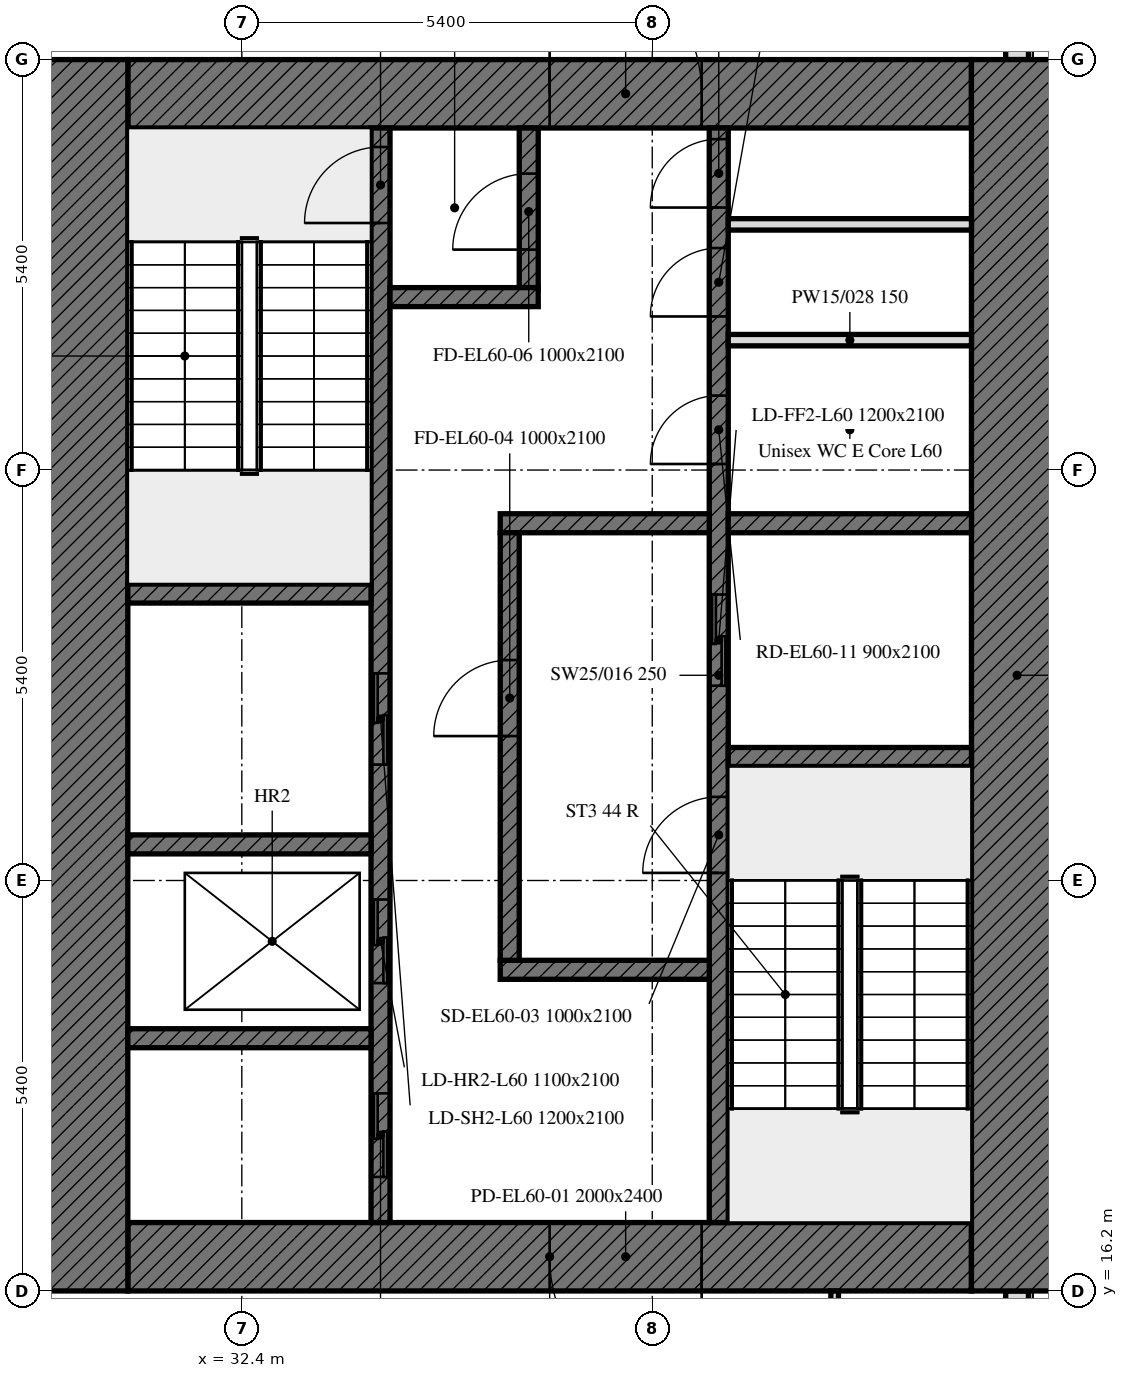
"""IFC4 building model, lengths in metres.
Left out: names, types, materials, properties, quantities, classifications, styles, units other than length and angle.
Written with IfcOpenShell. Run it as: python <this file> out.ifc"""

import sys

from ifc_helpers import new_model, si_unit, direction, frame, frame_2d, origin, place, context, subcontext, project, spatial, rectangle, extrude, element, fill, save


model = new_model("IFC4")
c1 = context("Model", 3, precision=1e-05, world=origin(), true_north=direction((0.0, 1.0)))
c2 = subcontext(c1, "Body", "Model", "MODEL_VIEW")
j1 = project(units=[si_unit("LENGTHUNIT", "METRE"), si_unit("PLANEANGLEUNIT", "RADIAN")], contexts=[c1])
p1 = place(None, origin())
s1 = spatial("IfcSite", under=j1, at=p1, CompositionType="ELEMENT")
p2 = place(p1, origin())
s2 = spatial("IfcBuilding", under=s1, at=p2, CompositionType="ELEMENT")
p3 = place(p2, frame((0.0, 0.0, 243.1)))
s3 = spatial("IfcBuildingStorey", under=s2, at=p3, CompositionType="ELEMENT", Elevation=243.1)
p4 = place(p3, frame((42.6, 10.8, 0.0), z_axis=(0.0, 0.0, 1.0), x_axis=(0.0, 1.0, 0.0)))
e1 = element("IfcWall", 1, at=p4, inside=s3, PredefinedType="SOLIDWALL", context=c2, shape_type="SweptSolid", body=[
    extrude(rectangle(XDim=5.4, YDim=0.3, at=frame_2d((2.7, 0.0))), origin(), (0.0, 0.0, 1.0), 7.5),
])
p5 = place(p4, frame((0.9, 0.0, 0.0)))
e2 = element("IfcOpeningElement", 2, at=p5, cuts=e1, PredefinedType="OPENING", context=c2, shape_type="SweptSolid", body=[
    extrude(rectangle(XDim=1.8, YDim=2.4, at=frame_2d((0.9, 1.2))), frame((0.0, 0.16, 0.0), z_axis=(0.0, -1.0, 0.0), x_axis=(1.0, 0.0, 0.0)), (0.0, 0.0, 1.0), 0.32),
])
p6 = place(p3, frame((42.6, 32.4, 0.0), z_axis=(0.0, 0.0, 1.0), x_axis=(0.0, 1.0, 0.0)))
e3 = element("IfcWall", 3, at=p6, inside=s3, PredefinedType="SOLIDWALL", context=c2, shape_type="SweptSolid", body=[
    extrude(rectangle(XDim=5.214, YDim=0.3, at=frame_2d((2.607, 0.0))), origin(), (0.0, 0.0, 1.0), 7.5),
])
p7 = place(p6, frame((1.3, 0.0, 0.0)))
e4 = element("IfcOpeningElement", 4, at=p7, cuts=e3, PredefinedType="OPENING", context=c2, shape_type="SweptSolid", body=[
    extrude(rectangle(XDim=1.8, YDim=2.4, at=frame_2d((0.9, 1.2))), frame((0.0, 0.16, 0.0), z_axis=(0.0, -1.0, 0.0), x_axis=(1.0, 0.0, 0.0)), (0.0, 0.0, 1.0), 0.32),
])
p8 = place(p3, frame((42.0, 16.65, 0.0), z_axis=(0.0, 0.0, 1.0), x_axis=(-1.0, 0.0, 0.0)))
e5 = element("IfcWall", 5, at=p8, inside=s3, PredefinedType="SOLIDWALL", context=c2, shape_type="SweptSolid", body=[
    extrude(rectangle(XDim=11.1, YDim=0.9, at=frame_2d((5.55, 0.0))), origin(), (0.0, 0.0, 1.0), 7.5),
])
p9 = place(p8, frame((3.55, 0.0, 0.0)))
e6 = element("IfcOpeningElement", 6, at=p9, cuts=e5, PredefinedType="OPENING", context=c2, shape_type="SweptSolid", body=[
    extrude(rectangle(XDim=2.0, YDim=2.4, at=frame_2d((1.0, 1.2))), frame((0.0, 0.45, 0.0), z_axis=(0.0, -1.0, 0.0), x_axis=(1.0, 0.0, 0.0)), (0.0, 0.0, 1.0), 0.9),
])
p10 = place(p3, frame((30.9, 31.95, 0.0), z_axis=(0.0, 0.0, 1.0), x_axis=(1.0, 0.0, 0.0)))
e7 = element("IfcWall", 7, at=p10, inside=s3, PredefinedType="SOLIDWALL", context=c2, shape_type="SweptSolid", body=[
    extrude(rectangle(XDim=11.1, YDim=0.9, at=frame_2d((5.55, 0.0))), origin(), (0.0, 0.0, 1.0), 7.5),
])
p11 = place(p10, frame((5.55, 0.0, 0.0)))
e8 = element("IfcOpeningElement", 8, at=p11, cuts=e7, PredefinedType="OPENING", context=c2, shape_type="SweptSolid", body=[
    extrude(rectangle(XDim=2.0, YDim=2.4, at=frame_2d((1.0, 1.2))), frame((0.0, 0.45, 0.0), z_axis=(0.0, -1.0, 0.0), x_axis=(1.0, 0.0, 0.0)), (0.0, 0.0, 1.0), 0.9),
])
for number, where, z_axis, x_axis in (
    (9, (42.6, 32.4, 0.0), (0.0, 0.0, 1.0), (0.0, -1.0, 0.0)),
    (10, (30.3, 16.2, 0.0), (0.0, 0.0, 1.0), (0.0, 1.0, 0.0)),
):
    element("IfcWall", number, at=place(p3, frame(where, z_axis=z_axis, x_axis=x_axis)), inside=s3, PredefinedType="SOLIDWALL", context=c2, shape_type="SweptSolid", body=[
        extrude(rectangle(XDim=16.2, YDim=1.2, at=frame_2d((8.1, 0.0))), origin(), (0.0, 0.0, 1.0), 7.5),
    ])
p12 = place(p3, frame((38.675, 17.1, 0.0), z_axis=(0.0, 0.0, 1.0), x_axis=(0.0, 1.0, 0.0)))
e11 = element("IfcWall", 11, at=p12, inside=s3, PredefinedType="SOLIDWALL", context=c2, shape_type="SweptSolid", body=[
    extrude(rectangle(XDim=14.4, YDim=0.25, at=frame_2d((7.2, 0.0))), origin(), (0.0, 0.0, 1.0), 7.5),
])
p13 = place(p12, frame((4.6, 0.0, 0.0)))
e12 = element("IfcOpeningElement", 12, at=p13, cuts=e11, PredefinedType="OPENING", context=c2, shape_type="SweptSolid", body=[
    extrude(rectangle(XDim=1.0, YDim=2.1, at=frame_2d((0.5, 1.05))), frame((0.0, 0.125, 0.0), z_axis=(0.0, -1.0, 0.0), x_axis=(1.0, 0.0, 0.0)), (0.0, 0.0, 1.0), 0.25),
])
p14 = place(p12, frame((7.062, 0.0, 0.0)))
e13 = element("IfcOpeningElement", 13, at=p14, cuts=e11, PredefinedType="OPENING", context=c2, shape_type="SweptSolid", body=[
    extrude(rectangle(XDim=1.2, YDim=2.1, at=frame_2d((0.6, 1.05))), frame((0.0, 0.125, 0.0), z_axis=(0.0, -1.0, 0.0), x_axis=(1.0, 0.0, 0.0)), (0.0, 0.0, 1.0), 0.25),
])
p15 = place(p12, frame((9.979, 0.0, 0.0)))
e14 = element("IfcOpeningElement", 14, at=p15, cuts=e11, PredefinedType="OPENING", context=c2, shape_type="SweptSolid", body=[
    extrude(rectangle(XDim=0.9, YDim=2.1, at=frame_2d((0.45, 1.05))), frame((0.0, 0.125, 0.0), z_axis=(0.0, -1.0, 0.0), x_axis=(1.0, 0.0, 0.0)), (0.0, 0.0, 1.0), 0.25),
])
p16 = place(p12, frame((11.92, 0.0, 0.0)))
e15 = element("IfcOpeningElement", 15, at=p16, cuts=e11, PredefinedType="OPENING", context=c2, shape_type="SweptSolid", body=[
    extrude(rectangle(XDim=0.9, YDim=2.1, at=frame_2d((0.45, 1.05))), frame((0.0, 0.125, 0.0), z_axis=(0.0, -1.0, 0.0), x_axis=(1.0, 0.0, 0.0)), (0.0, 0.0, 1.0), 0.25),
])
p17 = place(p12, frame((13.354, 0.0, 0.0)))
e16 = element("IfcOpeningElement", 16, at=p17, cuts=e11, PredefinedType="OPENING", context=c2, shape_type="SweptSolid", body=[
    extrude(rectangle(XDim=0.9, YDim=2.1, at=frame_2d((0.45, 1.05))), frame((0.0, 0.125, 0.0), z_axis=(0.0, -1.0, 0.0), x_axis=(1.0, 0.0, 0.0)), (0.0, 0.0, 1.0), 0.25),
])
p18 = place(p3, frame((34.225, 17.1, 0.0), z_axis=(0.0, 0.0, 1.0), x_axis=(0.0, 1.0, 0.0)))
e17 = element("IfcWall", 17, at=p18, inside=s3, PredefinedType="SOLIDWALL", context=c2, shape_type="SweptSolid", body=[
    extrude(rectangle(XDim=14.4, YDim=0.25, at=frame_2d((7.2, 0.0))), origin(), (0.0, 0.0, 1.0), 7.5),
])
p19 = place(p18, frame((13.15, 0.0, 0.0)))
e18 = element("IfcOpeningElement", 18, at=p19, cuts=e17, PredefinedType="OPENING", context=c2, shape_type="SweptSolid", body=[
    extrude(rectangle(XDim=1.0, YDim=2.1, at=frame_2d((0.5, 1.05))), frame((0.0, 0.125, 0.0), z_axis=(0.0, -1.0, 0.0), x_axis=(1.0, 0.0, 0.0)), (0.0, 0.0, 1.0), 0.25),
])
p20 = place(p18, frame((0.6, 0.0, 0.0)))
e19 = element("IfcOpeningElement", 19, at=p20, cuts=e17, PredefinedType="OPENING", context=c2, shape_type="SweptSolid", body=[
    extrude(rectangle(XDim=1.1, YDim=2.1, at=frame_2d((0.55, 1.05))), frame((0.0, 0.125, 0.0), z_axis=(0.0, -1.0, 0.0), x_axis=(1.0, 0.0, 0.0)), (0.0, 0.0, 1.0), 0.25),
])
p21 = place(p18, frame((3.15, 0.0, 0.0)))
e20 = element("IfcOpeningElement", 20, at=p21, cuts=e17, PredefinedType="OPENING", context=c2, shape_type="SweptSolid", body=[
    extrude(rectangle(XDim=1.1, YDim=2.1, at=frame_2d((0.55, 1.05))), frame((0.0, 0.125, 0.0), z_axis=(0.0, -1.0, 0.0), x_axis=(1.0, 0.0, 0.0)), (0.0, 0.0, 1.0), 0.25),
])
p22 = place(p18, frame((6.025, 0.0, 0.0)))
e21 = element("IfcOpeningElement", 21, at=p22, cuts=e17, PredefinedType="OPENING", context=c2, shape_type="SweptSolid", body=[
    extrude(rectangle(XDim=1.2, YDim=2.1, at=frame_2d((0.6, 1.05))), frame((0.0, 0.125, 0.0), z_axis=(0.0, -1.0, 0.0), x_axis=(1.0, 0.0, 0.0)), (0.0, 0.0, 1.0), 0.25),
])
p23 = place(p3, frame((38.8, 23.225, 0.0), z_axis=(0.0, 0.0, 1.0), x_axis=(1.0, 0.0, 0.0)))
e22 = element("IfcWall", 22, at=p23, inside=s3, PredefinedType="SOLIDWALL", context=c2, shape_type="SweptSolid", body=[
    extrude(rectangle(XDim=3.2, YDim=0.25, at=frame_2d((1.6, 0.0))), origin(), (0.0, 0.0, 1.0), 7.5),
])
for number, where, z_axis, x_axis in (
    (23, (30.9, 25.375, 0.0), (0.0, 0.0, 1.0), (1.0, 0.0, 0.0)),
    (24, (30.9, 22.075, 0.0), (0.0, 0.0, 1.0), (1.0, 0.0, 0.0)),
):
    element("IfcWall", number, at=place(p3, frame(where, z_axis=z_axis, x_axis=x_axis)), inside=s3, PredefinedType="SOLIDWALL", context=c2, shape_type="SweptSolid", body=[
        extrude(rectangle(XDim=3.2, YDim=0.25, at=frame_2d((1.6, 0.0))), origin(), (0.0, 0.0, 1.0), 7.5),
    ])
p24 = place(p3, frame((38.8, 26.3, 0.0), z_axis=(0.0, 0.0, 1.0), x_axis=(1.0, 0.0, 0.0)))
e25 = element("IfcWall", 25, at=p24, inside=s3, PredefinedType="SOLIDWALL", context=c2, shape_type="SweptSolid", body=[
    extrude(rectangle(XDim=3.2, YDim=0.25, at=frame_2d((1.6, 0.0))), origin(), (0.0, 0.0, 1.0), 7.5),
])
for number, where, z_axis, x_axis in (
    (26, (35.8, 26.3, 0.0), (0.0, 0.0, 1.0), (1.0, 0.0, 0.0)),
    (27, (35.8, 20.425, 0.0), (0.0, 0.0, 1.0), (1.0, 0.0, 0.0)),
):
    element("IfcWall", number, at=place(p3, frame(where, z_axis=z_axis, x_axis=x_axis)), inside=s3, PredefinedType="SOLIDWALL", context=c2, shape_type="SweptSolid", body=[
        extrude(rectangle(XDim=2.75, YDim=0.25, at=frame_2d((1.375, 0.0))), origin(), (0.0, 0.0, 1.0), 7.5),
    ])
p25 = place(p3, frame((36.175, 29.4, 0.0), z_axis=(0.0, 0.0, 1.0), x_axis=(0.0, 1.0, 0.0)))
e28 = element("IfcWall", 28, at=p25, inside=s3, PredefinedType="SOLIDWALL", context=c2, shape_type="SweptSolid", body=[
    extrude(rectangle(XDim=2.1, YDim=0.25, at=frame_2d((1.05, 0.0))), origin(), (0.0, 0.0, 1.0), 7.5),
])
p26 = place(p25, frame((0.5, 0.0, 0.0)))
e29 = element("IfcOpeningElement", 29, at=p26, cuts=e28, PredefinedType="OPENING", context=c2, shape_type="SweptSolid", body=[
    extrude(rectangle(XDim=1.0, YDim=2.1, at=frame_2d((0.5, 1.05))), frame((0.0, 0.125, 0.0), z_axis=(0.0, -1.0, 0.0), x_axis=(1.0, 0.0, 0.0)), (0.0, 0.0, 1.0), 0.25),
])
p27 = place(p3, frame((34.35, 29.275, 0.0), z_axis=(0.0, 0.0, 1.0), x_axis=(1.0, 0.0, 0.0)))
e30 = element("IfcWall", 30, at=p27, inside=s3, PredefinedType="SOLIDWALL", context=c2, shape_type="SweptSolid", body=[
    extrude(rectangle(XDim=1.95, YDim=0.25, at=frame_2d((0.975, 0.0))), origin(), (0.0, 0.0, 1.0), 7.5),
])
p28 = place(p3, frame((35.925, 20.55, 0.0), z_axis=(0.0, 0.0, 1.0), x_axis=(0.0, 1.0, 0.0)))
e31 = element("IfcWall", 31, at=p28, inside=s3, PredefinedType="SOLIDWALL", context=c2, shape_type="SweptSolid", body=[
    extrude(rectangle(XDim=5.625, YDim=0.25, at=frame_2d((2.812, 0.0))), origin(), (0.0, 0.0, 1.0), 7.5),
])
p29 = place(p28, frame((2.95, 0.0, 0.0)))
e32 = element("IfcOpeningElement", 32, at=p29, cuts=e31, PredefinedType="OPENING", context=c2, shape_type="SweptSolid", body=[
    extrude(rectangle(XDim=1.0, YDim=2.1, at=frame_2d((0.5, 1.05))), frame((0.0, 0.125, 0.0), z_axis=(0.0, -1.0, 0.0), x_axis=(1.0, 0.0, 0.0)), (0.0, 0.0, 1.0), 0.25),
])
p30 = place(p3, frame((30.9, 19.525, 0.0), z_axis=(0.0, 0.0, 1.0), x_axis=(1.0, 0.0, 0.0)))
e33 = element("IfcWall", 33, at=p30, inside=s3, PredefinedType="SOLIDWALL", context=c2, shape_type="SweptSolid", body=[
    extrude(rectangle(XDim=3.2, YDim=0.25, at=frame_2d((1.6, 0.0))), origin(), (0.0, 0.0, 1.0), 7.5),
])
for number, where, z_axis, x_axis in (
    (34, (38.8, 28.709, 0.0), (0.0, 0.0, 1.0), (1.0, 0.0, 0.0)),
    (35, (38.8, 30.232, 0.0), (0.0, 0.0, 1.0), (1.0, 0.0, 0.0)),
):
    element("IfcWall", number, at=place(p3, frame(where, z_axis=z_axis, x_axis=x_axis)), inside=s3, PredefinedType="PARTITIONING", context=c2, shape_type="SweptSolid", body=[
        extrude(rectangle(XDim=3.2, YDim=0.15, at=frame_2d((1.6, 0.0))), origin(), (0.0, 0.0, 1.0), 7.5),
    ])
p31 = place(p3, frame((40.2, 16.2, 0.0), z_axis=(0.0, 0.0, 1.0), x_axis=(0.0, -1.0, 0.0)))
e36 = element("IfcWall", 36, at=p31, inside=s3, PredefinedType="PARTITIONING", context=c2, shape_type="SweptSolid", body=[
    extrude(rectangle(XDim=2.75, YDim=0.1, at=frame_2d((1.375, 0.0))), origin(), (0.0, 0.0, 1.0), 7.5),
])
p32 = place(p31, frame((0.85, 0.0, 0.0)))
e37 = element("IfcOpeningElement", 37, at=p32, cuts=e36, PredefinedType="OPENING", context=c2, shape_type="SweptSolid", body=[
    extrude(rectangle(XDim=1.0, YDim=2.1, at=frame_2d((0.5, 1.05))), frame((0.0, 0.05, 0.0), z_axis=(0.0, -1.0, 0.0), x_axis=(1.0, 0.0, 0.0)), (0.0, 0.0, 1.0), 0.1),
])
p33 = place(p9, origin())
e38 = element("IfcDoor", 38, at=p33, inside=s3, OperationType="DOUBLE_DOOR_SINGLE_SWING", PredefinedType="DOOR", context=c2, shape_type="SweptSolid", body=[
    extrude(rectangle(XDim=2.0, YDim=2.4, at=frame_2d((1.0, 1.2))), frame((0.0, 0.025, 0.0), z_axis=(0.0, -1.0, 0.0), x_axis=(1.0, 0.0, 0.0)), (0.0, 0.0, 1.0), 0.05),
])
fill(e6, e38)
p34 = place(p11, origin())
e39 = element("IfcDoor", 39, at=p34, inside=s3, OperationType="DOUBLE_DOOR_SINGLE_SWING", PredefinedType="DOOR", context=c2, shape_type="SweptSolid", body=[
    extrude(rectangle(XDim=2.0, YDim=2.4, at=frame_2d((1.0, 1.2))), frame((0.0, 0.025, 0.0), z_axis=(0.0, -1.0, 0.0), x_axis=(1.0, 0.0, 0.0)), (0.0, 0.0, 1.0), 0.05),
])
fill(e8, e39)
p35 = place(p13, origin())
e40 = element("IfcDoor", 40, at=p35, inside=s3, OperationType="SINGLE_SWING_LEFT", PredefinedType="DOOR", context=c2, shape_type="SweptSolid", body=[
    extrude(rectangle(XDim=1.0, YDim=2.1, at=frame_2d((0.5, 1.05))), frame((0.0, 0.025, 0.0), z_axis=(0.0, -1.0, 0.0), x_axis=(1.0, 0.0, 0.0)), (0.0, 0.0, 1.0), 0.05),
])
fill(e12, e40)
p36 = place(p29, origin())
e41 = element("IfcDoor", 41, at=p36, inside=s3, OperationType="SINGLE_SWING_LEFT", PredefinedType="DOOR", context=c2, shape_type="SweptSolid", body=[
    extrude(rectangle(XDim=1.0, YDim=2.1, at=frame_2d((0.5, 1.05))), frame((0.0, 0.025, 0.0), z_axis=(0.0, -1.0, 0.0), x_axis=(1.0, 0.0, 0.0)), (0.0, 0.0, 1.0), 0.05),
])
fill(e32, e41)
p37 = place(p19, origin())
e42 = element("IfcDoor", 42, at=p37, inside=s3, OperationType="SINGLE_SWING_LEFT", PredefinedType="DOOR", context=c2, shape_type="SweptSolid", body=[
    extrude(rectangle(XDim=1.0, YDim=2.1, at=frame_2d((0.5, 1.05))), frame((0.0, 0.025, 0.0), z_axis=(0.0, -1.0, 0.0), x_axis=(1.0, 0.0, 0.0)), (0.0, 0.0, 1.0), 0.05),
])
fill(e18, e42)
p38 = place(p26, origin())
e43 = element("IfcDoor", 43, at=p38, inside=s3, OperationType="SINGLE_SWING_LEFT", PredefinedType="DOOR", context=c2, shape_type="SweptSolid", body=[
    extrude(rectangle(XDim=1.0, YDim=2.1, at=frame_2d((0.5, 1.05))), frame((0.0, 0.025, 0.0), z_axis=(0.0, -1.0, 0.0), x_axis=(1.0, 0.0, 0.0)), (0.0, 0.0, 1.0), 0.05),
])
fill(e29, e43)
p39 = place(p14, origin())
e44 = element("IfcDoor", 44, at=p39, inside=s3, OperationType="DOUBLE_DOOR_SLIDING", PredefinedType="DOOR", context=c2, shape_type="SweptSolid", body=[
    extrude(rectangle(XDim=1.2, YDim=2.1, at=frame_2d((0.6, 1.05))), frame((0.0, 0.025, 0.0), z_axis=(0.0, -1.0, 0.0), x_axis=(1.0, 0.0, 0.0)), (0.0, 0.0, 1.0), 0.05),
])
fill(e13, e44)
p40 = place(p20, origin())
e45 = element("IfcDoor", 45, at=p40, inside=s3, OperationType="DOUBLE_DOOR_SLIDING", PredefinedType="DOOR", context=c2, shape_type="SweptSolid", body=[
    extrude(rectangle(XDim=1.1, YDim=2.1, at=frame_2d((0.55, 1.05))), frame((0.0, 0.025, 0.0), z_axis=(0.0, -1.0, 0.0), x_axis=(1.0, 0.0, 0.0)), (0.0, 0.0, 1.0), 0.05),
])
fill(e19, e45)
p41 = place(p21, origin())
e46 = element("IfcDoor", 46, at=p41, inside=s3, OperationType="DOUBLE_DOOR_SLIDING", PredefinedType="DOOR", context=c2, shape_type="SweptSolid", body=[
    extrude(rectangle(XDim=1.1, YDim=2.1, at=frame_2d((0.55, 1.05))), frame((0.0, 0.025, 0.0), z_axis=(0.0, -1.0, 0.0), x_axis=(1.0, 0.0, 0.0)), (0.0, 0.0, 1.0), 0.05),
])
fill(e20, e46)
p42 = place(p22, origin())
e47 = element("IfcDoor", 47, at=p42, inside=s3, OperationType="DOUBLE_DOOR_SLIDING", PredefinedType="DOOR", context=c2, shape_type="SweptSolid", body=[
    extrude(rectangle(XDim=1.2, YDim=2.1, at=frame_2d((0.6, 1.05))), frame((0.0, 0.025, 0.0), z_axis=(0.0, -1.0, 0.0), x_axis=(1.0, 0.0, 0.0)), (0.0, 0.0, 1.0), 0.05),
])
fill(e21, e47)
p43 = place(p15, origin())
e48 = element("IfcDoor", 48, at=p43, inside=s3, OperationType="SINGLE_SWING_LEFT", PredefinedType="DOOR", context=c2, shape_type="SweptSolid", body=[
    extrude(rectangle(XDim=0.9, YDim=2.1, at=frame_2d((0.45, 1.05))), frame((0.0, 0.025, 0.0), z_axis=(0.0, -1.0, 0.0), x_axis=(1.0, 0.0, 0.0)), (0.0, 0.0, 1.0), 0.05),
])
fill(e14, e48)
p44 = place(p16, origin())
e49 = element("IfcDoor", 49, at=p44, inside=s3, OperationType="SINGLE_SWING_LEFT", PredefinedType="DOOR", context=c2, shape_type="SweptSolid", body=[
    extrude(rectangle(XDim=0.9, YDim=2.1, at=frame_2d((0.45, 1.05))), frame((0.0, 0.025, 0.0), z_axis=(0.0, -1.0, 0.0), x_axis=(1.0, 0.0, 0.0)), (0.0, 0.0, 1.0), 0.05),
])
fill(e15, e49)
p45 = place(p17, origin())
e50 = element("IfcDoor", 50, at=p45, inside=s3, OperationType="SINGLE_SWING_LEFT", PredefinedType="DOOR", context=c2, shape_type="SweptSolid", body=[
    extrude(rectangle(XDim=0.9, YDim=2.1, at=frame_2d((0.45, 1.05))), frame((0.0, 0.025, 0.0), z_axis=(0.0, -1.0, 0.0), x_axis=(1.0, 0.0, 0.0)), (0.0, 0.0, 1.0), 0.05),
])
fill(e16, e50)
save(model, sys.argv[1])
